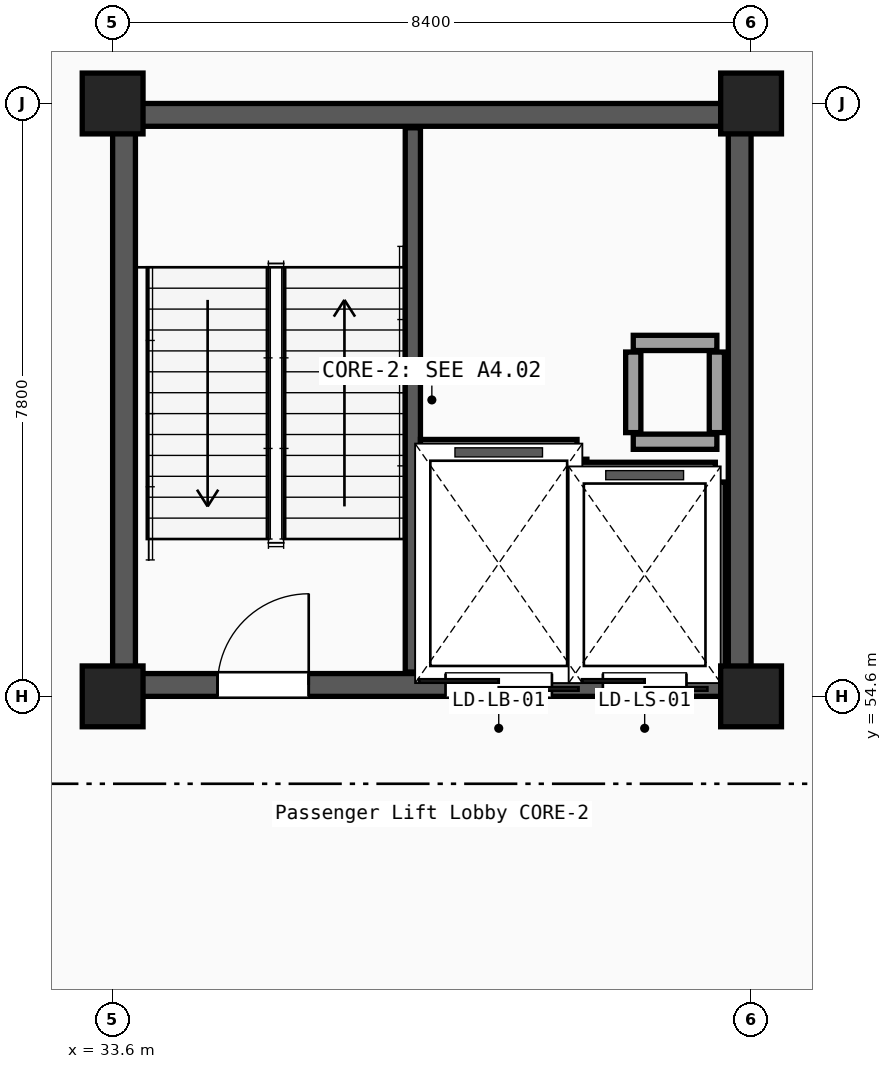
"""IFC4 building model, lengths in metres.
Left out: names, types, materials, properties, quantities, classifications, styles, units other than length and angle.
Written with IfcOpenShell. Run it as: python <this file> out.ifc"""

import sys

from ifc_helpers import new_model, si_unit, direction, frame, frame_2d, origin, origin_2d, place, context, subcontext, project, spatial, rectangle, extrude, element, fill, save


model = new_model("IFC4")
c1 = context("Model", 3, precision=1e-05, world=origin(), true_north=direction((0.0, 1.0)))
c2 = subcontext(c1, "Body", "Model", "MODEL_VIEW")
j1 = project(units=[si_unit("LENGTHUNIT", "METRE"), si_unit("PLANEANGLEUNIT", "RADIAN")], contexts=[c1])
p1 = place(None, origin())
s1 = spatial("IfcSite", under=j1, at=p1, CompositionType="ELEMENT")
p2 = place(p1, origin())
s2 = spatial("IfcBuilding", under=s1, at=p2, CompositionType="ELEMENT")
p3 = place(p2, frame((0.0, 0.0, -5.1)))
s3 = spatial("IfcBuildingStorey", under=s2, at=p3, CompositionType="ELEMENT", Elevation=-5.1)
for number, where, z_axis, x_axis in (
    (1, (33.6, 54.6, -0.22), (0.0, 0.0, 1.0), (1.0, 0.0, 0.0)),
    (2, (33.6, 62.4, -0.22), (0.0, 0.0, 1.0), (1.0, 0.0, 0.0)),
    (3, (42.0, 54.6, -0.22), (0.0, 0.0, 1.0), (1.0, 0.0, 0.0)),
    (4, (42.0, 62.4, -0.22), (0.0, 0.0, 1.0), (1.0, 0.0, 0.0)),
):
    element("IfcColumn", number, at=place(p3, frame(where, z_axis=z_axis, x_axis=x_axis)), inside=s3, PredefinedType="COLUMN", context=c2, shape_type="SweptSolid", body=[
        extrude(rectangle(XDim=0.8, YDim=0.8, at=origin_2d()), origin(), (0.0, 0.0, 1.0), 5.32),
    ])
p4 = place(p3, frame((33.6, 54.75, -0.22), z_axis=(0.0, 0.0, 1.0), x_axis=(1.0, 0.0, 0.0)))
e5 = element("IfcWall", 5, at=p4, inside=s3, PredefinedType="SHEAR", context=c2, shape_type="SweptSolid", body=[
    extrude(rectangle(XDim=8.4, YDim=0.3, at=frame_2d((4.2, 0.0))), origin(), (0.0, 0.0, 1.0), 5.07),
])
p5 = place(p4, frame((1.38, 0.0, 0.22)))
e6 = element("IfcOpeningElement", 6, at=p5, cuts=e5, PredefinedType="OPENING", context=c2, shape_type="SweptSolid", body=[
    extrude(rectangle(XDim=1.2, YDim=2.15, at=frame_2d((0.6, 1.075))), frame((0.0, 0.16, 0.0), z_axis=(0.0, -1.0, 0.0), x_axis=(1.0, 0.0, 0.0)), (0.0, 0.0, 1.0), 0.32),
])
p6 = place(p4, frame((4.38, 0.0, 0.22)))
e7 = element("IfcOpeningElement", 7, at=p6, cuts=e5, PredefinedType="OPENING", context=c2, shape_type="SweptSolid", body=[
    extrude(rectangle(XDim=1.4, YDim=2.2, at=frame_2d((0.7, 1.1))), frame((0.0, 0.16, 0.0), z_axis=(0.0, -1.0, 0.0), x_axis=(1.0, 0.0, 0.0)), (0.0, 0.0, 1.0), 0.32),
])
p7 = place(p4, frame((6.45, 0.0, 0.22)))
e8 = element("IfcOpeningElement", 8, at=p7, cuts=e5, PredefinedType="OPENING", context=c2, shape_type="SweptSolid", body=[
    extrude(rectangle(XDim=1.1, YDim=2.15, at=frame_2d((0.55, 1.075))), frame((0.0, 0.16, 0.0), z_axis=(0.0, -1.0, 0.0), x_axis=(1.0, 0.0, 0.0)), (0.0, 0.0, 1.0), 0.32),
])
p8 = place(p3, frame((33.6, 62.25, -0.22), z_axis=(0.0, 0.0, 1.0), x_axis=(1.0, 0.0, 0.0)))
e9 = element("IfcWall", 9, at=p8, inside=s3, PredefinedType="SHEAR", context=c2, shape_type="SweptSolid", body=[
    extrude(rectangle(XDim=8.4, YDim=0.3, at=frame_2d((4.2, 0.0))), origin(), (0.0, 0.0, 1.0), 5.07),
])
for number, where, z_axis, x_axis in (
    (10, (33.75, 54.9, -0.22), (0.0, 0.0, 1.0), (0.0, 1.0, 0.0)),
    (11, (41.85, 54.9, -0.22), (0.0, 0.0, 1.0), (0.0, 1.0, 0.0)),
):
    element("IfcWall", number, at=place(p3, frame(where, z_axis=z_axis, x_axis=x_axis)), inside=s3, PredefinedType="SHEAR", context=c2, shape_type="SweptSolid", body=[
        extrude(rectangle(XDim=7.2, YDim=0.3, at=frame_2d((3.6, 0.0))), origin(), (0.0, 0.0, 1.0), 5.07),
    ])
p9 = place(p3, frame((37.55, 54.92, -0.22), z_axis=(0.0, 0.0, 1.0), x_axis=(0.0, 1.0, 0.0)))
e12 = element("IfcWall", 12, at=p9, inside=s3, PredefinedType="SHEAR", context=c2, shape_type="SweptSolid", body=[
    extrude(rectangle(XDim=7.16, YDim=0.2, at=frame_2d((3.58, 0.0))), origin(), (0.0, 0.0, 1.0), 5.07),
])
for number, where, z_axis, x_axis in (
    (13, (40.45, 57.95, 0.0), (0.0, 0.0, 1.0), (1.0, 0.0, 0.0)),
    (14, (40.45, 59.25, 0.0), (0.0, 0.0, 1.0), (1.0, 0.0, 0.0)),
):
    element("IfcWall", number, at=place(p3, frame(where, z_axis=z_axis, x_axis=x_axis)), inside=s3, PredefinedType="PARTITIONING", context=c2, shape_type="SweptSolid", body=[
        extrude(rectangle(XDim=1.1, YDim=0.2, at=frame_2d((0.55, 0.0))), origin(), (0.0, 0.0, 1.0), 4.23),
    ])
for number, where, z_axis, x_axis in (
    (15, (40.45, 58.07, 0.0), (0.0, 0.0, 1.0), (0.0, 1.0, 0.0)),
    (16, (41.55, 58.07, 0.0), (0.0, 0.0, 1.0), (0.0, 1.0, 0.0)),
):
    element("IfcWall", number, at=place(p3, frame(where, z_axis=z_axis, x_axis=x_axis)), inside=s3, PredefinedType="PARTITIONING", context=c2, shape_type="SweptSolid", body=[
        extrude(rectangle(XDim=1.06, YDim=0.2, at=frame_2d((0.53, 0.0))), origin(), (0.0, 0.0, 1.0), 4.23),
    ])
p10 = place(p3, frame((39.74, 54.98, 0.0), z_axis=(0.0, 0.0, 1.0), x_axis=(0.0, 1.0, 0.0)))
e17 = element("IfcWall", 17, at=p10, inside=s3, PredefinedType="PARTITIONING", context=c2, shape_type="SweptSolid", body=[
    extrude(rectangle(XDim=2.74, YDim=0.2, at=frame_2d((1.37, 0.0))), origin(), (0.0, 0.0, 1.0), 4.23),
])
p11 = place(p3, frame((37.65, 57.88, 0.0), z_axis=(0.0, 0.0, 1.0), x_axis=(1.0, 0.0, 0.0)))
e18 = element("IfcWall", 18, at=p11, inside=s3, PredefinedType="PARTITIONING", context=c2, shape_type="SweptSolid", body=[
    extrude(rectangle(XDim=2.06, YDim=0.2, at=frame_2d((1.03, 0.0))), origin(), (0.0, 0.0, 1.0), 4.23),
])
p12 = place(p3, frame((41.56, 54.98, 0.0), z_axis=(0.0, 0.0, 1.0), x_axis=(0.0, 1.0, 0.0)))
e19 = element("IfcWall", 19, at=p12, inside=s3, PredefinedType="PARTITIONING", context=c2, shape_type="SweptSolid", body=[
    extrude(rectangle(XDim=2.44, YDim=0.2, at=frame_2d((1.22, 0.0))), origin(), (0.0, 0.0, 1.0), 4.23),
])
p13 = place(p3, frame((39.67, 57.58, 0.0), z_axis=(0.0, 0.0, 1.0), x_axis=(1.0, 0.0, 0.0)))
e20 = element("IfcWall", 20, at=p13, inside=s3, PredefinedType="PARTITIONING", context=c2, shape_type="SweptSolid", body=[
    extrude(rectangle(XDim=1.86, YDim=0.2, at=frame_2d((0.93, 0.0))), origin(), (0.0, 0.0, 1.0), 4.23),
])
p14 = place(p5, origin())
e21 = element("IfcDoor", 21, at=p14, inside=s3, OperationType="SINGLE_SWING_RIGHT", PredefinedType="DOOR", context=c2, shape_type="SweptSolid", body=[
    extrude(rectangle(XDim=1.2, YDim=2.15, at=frame_2d((0.6, 1.075))), frame((0.0, 0.025, 0.0), z_axis=(0.0, -1.0, 0.0), x_axis=(1.0, 0.0, 0.0)), (0.0, 0.0, 1.0), 0.05),
])
fill(e6, e21)
p15 = place(p6, origin())
e22 = element("IfcDoor", 22, at=p15, inside=s3, OperationType="DOUBLE_DOOR_SLIDING", PredefinedType="DOOR", context=c2, shape_type="SweptSolid", body=[
    extrude(rectangle(XDim=1.4, YDim=2.2, at=frame_2d((0.7, 1.1))), frame((0.0, 0.025, 0.0), z_axis=(0.0, -1.0, 0.0), x_axis=(1.0, 0.0, 0.0)), (0.0, 0.0, 1.0), 0.05),
])
fill(e7, e22)
p16 = place(p7, origin())
e23 = element("IfcDoor", 23, at=p16, inside=s3, OperationType="DOUBLE_DOOR_SLIDING", PredefinedType="DOOR", context=c2, shape_type="SweptSolid", body=[
    extrude(rectangle(XDim=1.1, YDim=2.15, at=frame_2d((0.55, 1.075))), frame((0.0, 0.025, 0.0), z_axis=(0.0, -1.0, 0.0), x_axis=(1.0, 0.0, 0.0)), (0.0, 0.0, 1.0), 0.05),
])
fill(e8, e23)
save(model, sys.argv[1])
